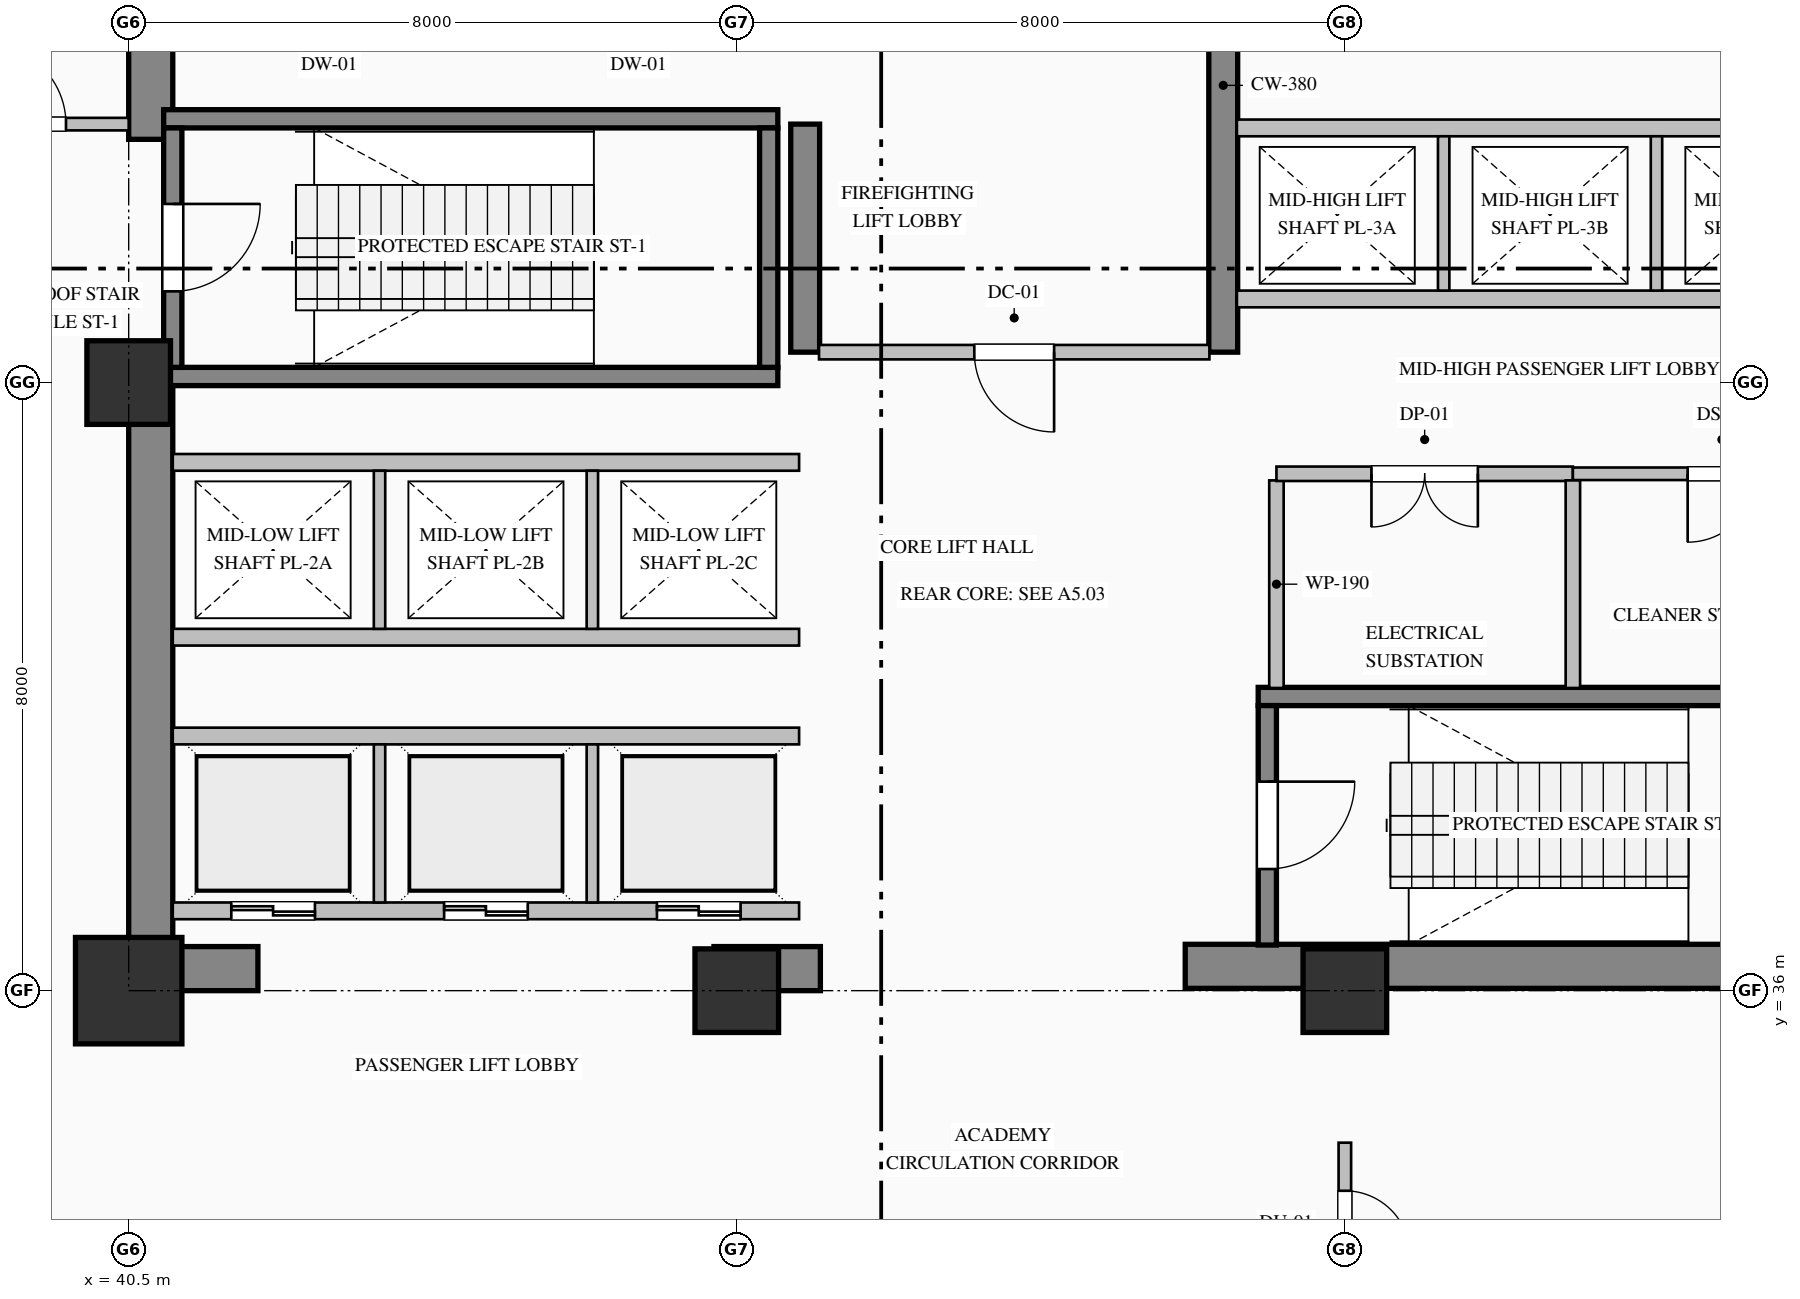
"""IFC4 building model, lengths in metres.
Left out: names, types, materials, properties, quantities, classifications, styles, units other than length and angle.
Written with IfcOpenShell. Run it as: python <this file> out.ifc"""

import sys

from ifc_helpers import new_model, si_unit, direction, frame, frame_2d, origin, origin_2d, place, context, subcontext, project, spatial, rectangle, hollow_rectangle, extrude, element, fill, save


model = new_model("IFC4")
c1 = context("Model", 3, precision=1e-05, world=origin(), true_north=direction((0.0, 1.0)))
c2 = subcontext(c1, "Body", "Model", "MODEL_VIEW")
j1 = project(units=[si_unit("LENGTHUNIT", "METRE"), si_unit("PLANEANGLEUNIT", "RADIAN")], contexts=[c1])
p1 = place(None, origin())
s1 = spatial("IfcSite", under=j1, at=p1, CompositionType="ELEMENT")
p2 = place(p1, origin())
s2 = spatial("IfcBuilding", under=s1, at=p2, CompositionType="ELEMENT")
p3 = place(p2, frame((0.0, 0.0, 17.4)))
s3 = spatial("IfcBuildingStorey", under=s2, at=p3, CompositionType="ELEMENT", Elevation=17.4)
p4 = place(p3, frame((40.79, 36.58, 0.0), z_axis=(0.0, 0.0, 1.0), x_axis=(0.0, 1.0, 0.0)))
e1 = element("IfcWall", 1, at=p4, inside=s3, PredefinedType="SHEAR", context=c2, shape_type="SweptSolid", body=[
    extrude(rectangle(XDim=7.82, YDim=0.58, at=frame_2d((3.91, 0.0))), origin(), (0.0, 0.0, 1.0), 5.14),
])
p5 = place(p3, frame((40.79, 47.2, 0.0), z_axis=(0.0, 0.0, 1.0), x_axis=(0.0, 1.0, 0.0)))
e2 = element("IfcWall", 2, at=p5, inside=s3, PredefinedType="SHEAR", context=c2, shape_type="SweptSolid", body=[
    extrude(rectangle(XDim=4.22, YDim=0.58, at=frame_2d((2.11, 0.0))), origin(), (0.0, 0.0, 1.0), 5.14),
])
p6 = place(p3, frame((40.5, 36.29, 0.0), z_axis=(0.0, 0.0, 1.0), x_axis=(1.0, 0.0, 0.0)))
e3 = element("IfcWall", 3, at=p6, inside=s3, PredefinedType="SHEAR", context=c2, shape_type="SweptSolid", body=[
    extrude(rectangle(XDim=1.7, YDim=0.58, at=frame_2d((0.85, 0.0))), origin(), (0.0, 0.0, 1.0), 5.14),
])
p7 = place(p3, frame((48.2, 36.29, 0.0), z_axis=(0.0, 0.0, 1.0), x_axis=(1.0, 0.0, 0.0)))
e4 = element("IfcWall", 4, at=p7, inside=s3, PredefinedType="SHEAR", context=c2, shape_type="SweptSolid", body=[
    extrude(rectangle(XDim=1.4, YDim=0.58, at=frame_2d((0.7, 0.0))), origin(), (0.0, 0.0, 1.0), 5.14),
])
p8 = place(p3, frame((54.4, 36.32, 0.0), z_axis=(0.0, 0.0, 1.0), x_axis=(1.0, 0.0, 0.0)))
e5 = element("IfcWall", 5, at=p8, inside=s3, PredefinedType="SHEAR", context=c2, shape_type="SweptSolid", body=[
    extrude(rectangle(XDim=9.6, YDim=0.58, at=frame_2d((4.8, 0.0))), origin(), (0.0, 0.0, 1.0), 5.4),
])
p9 = place(p3, frame((49.4, 44.4, 0.0), z_axis=(0.0, 0.0, 1.0), x_axis=(0.0, 1.0, 0.0)))
e6 = element("IfcWall", 6, at=p9, inside=s3, PredefinedType="SHEAR", context=c2, shape_type="SweptSolid", body=[
    extrude(rectangle(XDim=3.0, YDim=0.38, at=frame_2d((1.5, 0.0))), origin(), (0.0, 0.0, 1.0), 5.14),
])
p10 = place(p3, frame((54.9, 44.4, 0.0), z_axis=(0.0, 0.0, 1.0), x_axis=(0.0, 1.0, 0.0)))
e7 = element("IfcWall", 7, at=p10, inside=s3, PredefinedType="SHEAR", context=c2, shape_type="SweptSolid", body=[
    extrude(rectangle(XDim=7.02, YDim=0.38, at=frame_2d((3.51, 0.0))), origin(), (0.0, 0.0, 1.0), 5.14),
])
p11 = place(p3, frame((40.5, 36.0, 0.0), z_axis=(0.0, 0.0, 1.0), x_axis=(1.0, 0.0, 0.0)))
e8 = element("IfcColumn", 8, at=p11, inside=s3, PredefinedType="COLUMN", context=c2, shape_type="SweptSolid", body=[
    extrude(hollow_rectangle(XDim=1.4, YDim=1.4, WallThickness=0.05, at=origin_2d()), origin(), (0.0, 0.0, 1.0), 5.4),
])
for number, where, z_axis, x_axis in (
    (9, (40.5, 44.0, 0.0), (0.0, 0.0, 1.0), (1.0, 0.0, 0.0)),
    (10, (48.5, 36.0, 0.0), (0.0, 0.0, 1.0), (1.0, 0.0, 0.0)),
    (11, (56.5, 36.0, 0.0), (0.0, 0.0, 1.0), (1.0, 0.0, 0.0)),
):
    element("IfcColumn", number, at=place(p3, frame(where, z_axis=z_axis, x_axis=x_axis)), inside=s3, PredefinedType="COLUMN", context=c2, shape_type="SweptSolid", body=[
        extrude(rectangle(XDim=1.1, YDim=1.1, at=origin_2d()), origin(), (0.0, 0.0, 1.0), 5.4),
    ])
for number, where, z_axis, x_axis in (
    (12, (40.96, 47.47, 0.0), (0.0, 0.0, 1.0), (1.0, 0.0, 0.0)),
    (13, (49.04, 44.08, 0.0), (0.0, 0.0, 1.0), (-1.0, 0.0, 0.0)),
):
    element("IfcWall", number, at=place(p3, frame(where, z_axis=z_axis, x_axis=x_axis)), inside=s3, PredefinedType="SOLIDWALL", context=c2, shape_type="SweptSolid", body=[
        extrude(rectangle(XDim=8.08, YDim=0.24, at=frame_2d((4.04, 0.0))), origin(), (0.0, 0.0, 1.0), 5.4),
    ])
p12 = place(p3, frame((41.08, 47.35, 0.0), z_axis=(0.0, 0.0, 1.0), x_axis=(0.0, -1.0, 0.0)))
e14 = element("IfcWall", 14, at=p12, inside=s3, PredefinedType="SOLIDWALL", context=c2, shape_type="SweptSolid", body=[
    extrude(rectangle(XDim=3.15, YDim=0.24, at=frame_2d((1.575, 0.0))), origin(), (0.0, 0.0, 1.0), 5.4),
])
p13 = place(p12, frame((1.0, 0.0, 0.0)))
e15 = element("IfcOpeningElement", 15, at=p13, cuts=e14, PredefinedType="OPENING", context=c2, shape_type="SweptSolid", body=[
    extrude(rectangle(XDim=1.15, YDim=2.2, at=frame_2d((0.575, 1.1))), frame((0.0, 0.13, 0.0), z_axis=(0.0, -1.0, 0.0), x_axis=(1.0, 0.0, 0.0)), (0.0, 0.0, 1.0), 0.26),
])
p14 = place(p3, frame((48.92, 44.2, 0.0), z_axis=(0.0, 0.0, 1.0), x_axis=(0.0, 1.0, 0.0)))
e16 = element("IfcWall", 16, at=p14, inside=s3, PredefinedType="SOLIDWALL", context=c2, shape_type="SweptSolid", body=[
    extrude(rectangle(XDim=3.15, YDim=0.24, at=frame_2d((1.575, 0.0))), origin(), (0.0, 0.0, 1.0), 5.4),
])
p15 = place(p3, frame((55.36, 39.87, 0.0), z_axis=(0.0, 0.0, 1.0), x_axis=(1.0, 0.0, 0.0)))
e17 = element("IfcWall", 17, at=p15, inside=s3, PredefinedType="SOLIDWALL", context=c2, shape_type="SweptSolid", body=[
    extrude(rectangle(XDim=8.08, YDim=0.24, at=frame_2d((4.04, 0.0))), origin(), (0.0, 0.0, 1.0), 5.4),
])
p16 = place(p3, frame((55.48, 39.75, 0.0), z_axis=(0.0, 0.0, 1.0), x_axis=(0.0, -1.0, 0.0)))
e18 = element("IfcWall", 18, at=p16, inside=s3, PredefinedType="SOLIDWALL", context=c2, shape_type="SweptSolid", body=[
    extrude(rectangle(XDim=3.15, YDim=0.24, at=frame_2d((1.575, 0.0))), origin(), (0.0, 0.0, 1.0), 5.4),
])
p17 = place(p16, frame((1.0, 0.0, 0.0)))
e19 = element("IfcOpeningElement", 19, at=p17, cuts=e18, PredefinedType="OPENING", context=c2, shape_type="SweptSolid", body=[
    extrude(rectangle(XDim=1.15, YDim=2.2, at=frame_2d((0.575, 1.1))), frame((0.0, 0.13, 0.0), z_axis=(0.0, -1.0, 0.0), x_axis=(1.0, 0.0, 0.0)), (0.0, 0.0, 1.0), 0.26),
])
p18 = place(p3, frame((49.32, 37.05, 0.0), z_axis=(0.0, 0.0, 1.0), x_axis=(-1.0, 0.0, 0.0)))
e20 = element("IfcWall", 20, at=p18, inside=s3, PredefinedType="PARTITIONING", context=c2, shape_type="SweptSolid", body=[
    extrude(rectangle(XDim=8.24, YDim=0.22, at=frame_2d((4.12, 0.0))), origin(), (0.0, 0.0, 1.0), 5.14),
])
p19 = place(p18, frame((6.37, 0.0, 0.0)))
e21 = element("IfcOpeningElement", 21, at=p19, cuts=e20, PredefinedType="OPENING", context=c2, shape_type="SweptSolid", body=[
    extrude(rectangle(XDim=1.1, YDim=2.2, at=frame_2d((0.55, 1.1))), frame((0.0, 0.12, 0.0), z_axis=(0.0, -1.0, 0.0), x_axis=(1.0, 0.0, 0.0)), (0.0, 0.0, 1.0), 0.24),
])
p20 = place(p18, frame((3.57, 0.0, 0.0)))
e22 = element("IfcOpeningElement", 22, at=p20, cuts=e20, PredefinedType="OPENING", context=c2, shape_type="SweptSolid", body=[
    extrude(rectangle(XDim=1.1, YDim=2.2, at=frame_2d((0.55, 1.1))), frame((0.0, 0.12, 0.0), z_axis=(0.0, -1.0, 0.0), x_axis=(1.0, 0.0, 0.0)), (0.0, 0.0, 1.0), 0.24),
])
p21 = place(p18, frame((0.77, 0.0, 0.0)))
e23 = element("IfcOpeningElement", 23, at=p21, cuts=e20, PredefinedType="OPENING", context=c2, shape_type="SweptSolid", body=[
    extrude(rectangle(XDim=1.1, YDim=2.2, at=frame_2d((0.55, 1.1))), frame((0.0, 0.12, 0.0), z_axis=(0.0, -1.0, 0.0), x_axis=(1.0, 0.0, 0.0)), (0.0, 0.0, 1.0), 0.24),
])
p22 = place(p3, frame((41.08, 39.35, 0.0), z_axis=(0.0, 0.0, 1.0), x_axis=(1.0, 0.0, 0.0)))
e24 = element("IfcWall", 24, at=p22, inside=s3, PredefinedType="PARTITIONING", context=c2, shape_type="SweptSolid", body=[
    extrude(rectangle(XDim=8.24, YDim=0.22, at=frame_2d((4.12, 0.0))), origin(), (0.0, 0.0, 1.0), 5.14),
])
for number, where, z_axis, x_axis in (
    (25, (43.8, 37.16, 0.0), (0.0, 0.0, 1.0), (0.0, 1.0, 0.0)),
    (26, (46.6, 37.16, 0.0), (0.0, 0.0, 1.0), (0.0, 1.0, 0.0)),
):
    element("IfcWall", number, at=place(p3, frame(where, z_axis=z_axis, x_axis=x_axis)), inside=s3, PredefinedType="PARTITIONING", context=c2, shape_type="SweptSolid", body=[
        extrude(rectangle(XDim=2.08, YDim=0.15, at=frame_2d((1.04, 0.0))), origin(), (0.0, 0.0, 1.0), 5.14),
    ])
for number, where, z_axis, x_axis in (
    (27, (49.32, 40.65, 0.0), (0.0, 0.0, 1.0), (-1.0, 0.0, 0.0)),
    (28, (41.08, 42.95, 0.0), (0.0, 0.0, 1.0), (1.0, 0.0, 0.0)),
):
    element("IfcWall", number, at=place(p3, frame(where, z_axis=z_axis, x_axis=x_axis)), inside=s3, PredefinedType="PARTITIONING", context=c2, shape_type="SweptSolid", body=[
        extrude(rectangle(XDim=8.24, YDim=0.22, at=frame_2d((4.12, 0.0))), origin(), (0.0, 0.0, 1.0), 5.14),
    ])
for number, where, z_axis, x_axis in (
    (29, (43.8, 40.76, 0.0), (0.0, 0.0, 1.0), (0.0, 1.0, 0.0)),
    (30, (46.6, 40.76, 0.0), (0.0, 0.0, 1.0), (0.0, 1.0, 0.0)),
):
    element("IfcWall", number, at=place(p3, frame(where, z_axis=z_axis, x_axis=x_axis)), inside=s3, PredefinedType="PARTITIONING", context=c2, shape_type="SweptSolid", body=[
        extrude(rectangle(XDim=2.08, YDim=0.15, at=frame_2d((1.04, 0.0))), origin(), (0.0, 0.0, 1.0), 5.14),
    ])
for number, where, z_axis, x_axis in (
    (31, (63.32, 45.1, 0.0), (0.0, 0.0, 1.0), (-1.0, 0.0, 0.0)),
    (32, (55.08, 47.35, 0.0), (0.0, 0.0, 1.0), (1.0, 0.0, 0.0)),
):
    element("IfcWall", number, at=place(p3, frame(where, z_axis=z_axis, x_axis=x_axis)), inside=s3, PredefinedType="PARTITIONING", context=c2, shape_type="SweptSolid", body=[
        extrude(rectangle(XDim=8.24, YDim=0.22, at=frame_2d((4.12, 0.0))), origin(), (0.0, 0.0, 1.0), 5.14),
    ])
for number, where, z_axis, x_axis in (
    (33, (57.8, 45.21, 0.0), (0.0, 0.0, 1.0), (0.0, 1.0, 0.0)),
    (34, (60.6, 45.21, 0.0), (0.0, 0.0, 1.0), (0.0, 1.0, 0.0)),
):
    element("IfcWall", number, at=place(p3, frame(where, z_axis=z_axis, x_axis=x_axis)), inside=s3, PredefinedType="PARTITIONING", context=c2, shape_type="SweptSolid", body=[
        extrude(rectangle(XDim=2.03, YDim=0.15, at=frame_2d((1.015, 0.0))), origin(), (0.0, 0.0, 1.0), 5.14),
    ])
p23 = place(p3, frame((37.8, 47.4, 0.0), z_axis=(0.0, 0.0, 1.0), x_axis=(1.0, 0.0, 0.0)))
e35 = element("IfcWall", 35, at=p23, inside=s3, PredefinedType="PARTITIONING", context=c2, shape_type="SweptSolid", body=[
    extrude(rectangle(XDim=2.7, YDim=0.165, at=frame_2d((1.35, 0.0))), origin(), (0.0, 0.0, 1.0), 5.14),
])
p24 = place(p23, frame((0.825, 0.0, 0.0)))
e36 = element("IfcOpeningElement", 36, at=p24, cuts=e35, PredefinedType="OPENING", context=c2, shape_type="SweptSolid", body=[
    extrude(rectangle(XDim=1.05, YDim=2.15, at=frame_2d((0.525, 1.075))), frame((0.0, 0.093, 0.0), z_axis=(0.0, -1.0, 0.0), x_axis=(1.0, 0.0, 0.0)), (0.0, 0.0, 1.0), 0.185),
])
p25 = place(p3, frame((54.718, 44.4, 0.0), z_axis=(0.0, 0.0, 1.0), x_axis=(-1.0, 0.0, 0.0)))
e37 = element("IfcWall", 37, at=p25, inside=s3, PredefinedType="PARTITIONING", context=c2, shape_type="SweptSolid", body=[
    extrude(rectangle(XDim=5.136, YDim=0.19, at=frame_2d((2.568, 0.0))), origin(), (0.0, 0.0, 1.0), 5.14),
])
p26 = place(p25, frame((2.043, 0.0, 0.0)))
e38 = element("IfcOpeningElement", 38, at=p26, cuts=e37, PredefinedType="OPENING", context=c2, shape_type="SweptSolid", body=[
    extrude(rectangle(XDim=1.05, YDim=2.15, at=frame_2d((0.525, 1.075))), frame((0.0, 0.105, 0.0), z_axis=(0.0, -1.0, 0.0), x_axis=(1.0, 0.0, 0.0)), (0.0, 0.0, 1.0), 0.21),
])
p27 = place(p3, frame((55.6, 42.713, 0.0), z_axis=(0.0, 0.0, 1.0), x_axis=(0.0, -1.0, 0.0)))
e39 = element("IfcWall", 39, at=p27, inside=s3, PredefinedType="PARTITIONING", context=c2, shape_type="SweptSolid", body=[
    extrude(rectangle(XDim=2.731, YDim=0.19, at=frame_2d((1.365, 0.0))), origin(), (0.0, 0.0, 1.0), 5.14),
])
p28 = place(p3, frame((59.5, 42.8, 0.0), z_axis=(0.0, 0.0, 1.0), x_axis=(-1.0, 0.0, 0.0)))
e40 = element("IfcWall", 40, at=p28, inside=s3, PredefinedType="PARTITIONING", context=c2, shape_type="SweptSolid", body=[
    extrude(rectangle(XDim=3.9, YDim=0.19, at=frame_2d((1.95, 0.0))), origin(), (0.0, 0.0, 1.0), 5.14),
])
p29 = place(p28, frame((1.25, 0.0, 0.0)))
e41 = element("IfcOpeningElement", 41, at=p29, cuts=e40, PredefinedType="OPENING", context=c2, shape_type="SweptSolid", body=[
    extrude(rectangle(XDim=1.4, YDim=2.25, at=frame_2d((0.7, 1.125))), frame((0.0, 0.105, 0.0), z_axis=(0.0, -1.0, 0.0), x_axis=(1.0, 0.0, 0.0)), (0.0, 0.0, 1.0), 0.21),
])
p30 = place(p3, frame((63.42, 42.8, 0.0), z_axis=(0.0, 0.0, 1.0), x_axis=(-1.0, 0.0, 0.0)))
e42 = element("IfcWall", 42, at=p30, inside=s3, PredefinedType="PARTITIONING", context=c2, shape_type="SweptSolid", body=[
    extrude(rectangle(XDim=3.92, YDim=0.165, at=frame_2d((1.96, 0.0))), origin(), (0.0, 0.0, 1.0), 5.14),
])
p31 = place(p30, frame((1.51, 0.0, 0.0)))
e43 = element("IfcOpeningElement", 43, at=p31, cuts=e42, PredefinedType="OPENING", context=c2, shape_type="SweptSolid", body=[
    extrude(rectangle(XDim=0.9, YDim=2.15, at=frame_2d((0.45, 1.075))), frame((0.0, 0.093, 0.0), z_axis=(0.0, -1.0, 0.0), x_axis=(1.0, 0.0, 0.0)), (0.0, 0.0, 1.0), 0.185),
])
p32 = place(p3, frame((59.5, 42.713, 0.0), z_axis=(0.0, 0.0, 1.0), x_axis=(0.0, -1.0, 0.0)))
e44 = element("IfcWall", 44, at=p32, inside=s3, PredefinedType="PARTITIONING", context=c2, shape_type="SweptSolid", body=[
    extrude(rectangle(XDim=2.731, YDim=0.19, at=frame_2d((1.365, 0.0))), origin(), (0.0, 0.0, 1.0), 5.14),
])
p33 = place(p3, frame((56.5, 34.0, 0.0), z_axis=(0.0, 0.0, 1.0), x_axis=(0.0, -1.0, 0.0)))
e45 = element("IfcWall", 45, at=p33, inside=s3, PredefinedType="PARTITIONING", context=c2, shape_type="SweptSolid", body=[
    extrude(rectangle(XDim=2.125, YDim=0.165, at=frame_2d((1.063, 0.0))), origin(), (0.0, 0.0, 1.0), 4.232),
])
p34 = place(p33, frame((0.633, 0.0, 0.0)))
e46 = element("IfcOpeningElement", 46, at=p34, cuts=e45, PredefinedType="OPENING", context=c2, shape_type="SweptSolid", body=[
    extrude(rectangle(XDim=0.86, YDim=2.1, at=frame_2d((0.43, 1.05))), frame((0.0, 0.093, 0.0), z_axis=(0.0, -1.0, 0.0), x_axis=(1.0, 0.0, 0.0)), (0.0, 0.0, 1.0), 0.185),
])
p35 = place(p13, origin())
e47 = element("IfcDoor", 47, at=p35, inside=s3, OperationType="SINGLE_SWING_LEFT", PredefinedType="DOOR", context=c2, shape_type="SweptSolid", body=[
    extrude(rectangle(XDim=1.15, YDim=2.2, at=frame_2d((0.575, 1.1))), frame((0.0, 0.025, 0.0), z_axis=(0.0, -1.0, 0.0), x_axis=(1.0, 0.0, 0.0)), (0.0, 0.0, 1.0), 0.05),
])
fill(e15, e47)
p36 = place(p17, origin())
e48 = element("IfcDoor", 48, at=p36, inside=s3, OperationType="SINGLE_SWING_LEFT", PredefinedType="DOOR", context=c2, shape_type="SweptSolid", body=[
    extrude(rectangle(XDim=1.15, YDim=2.2, at=frame_2d((0.575, 1.1))), frame((0.0, 0.025, 0.0), z_axis=(0.0, -1.0, 0.0), x_axis=(1.0, 0.0, 0.0)), (0.0, 0.0, 1.0), 0.05),
])
fill(e19, e48)
p37 = place(p19, origin())
e49 = element("IfcDoor", 49, at=p37, inside=s3, OperationType="DOUBLE_DOOR_SLIDING", PredefinedType="DOOR", context=c2, shape_type="SweptSolid", body=[
    extrude(rectangle(XDim=1.1, YDim=2.2, at=frame_2d((0.55, 1.1))), frame((0.0, 0.025, 0.0), z_axis=(0.0, -1.0, 0.0), x_axis=(1.0, 0.0, 0.0)), (0.0, 0.0, 1.0), 0.05),
])
fill(e21, e49)
p38 = place(p20, origin())
e50 = element("IfcDoor", 50, at=p38, inside=s3, OperationType="DOUBLE_DOOR_SLIDING", PredefinedType="DOOR", context=c2, shape_type="SweptSolid", body=[
    extrude(rectangle(XDim=1.1, YDim=2.2, at=frame_2d((0.55, 1.1))), frame((0.0, 0.025, 0.0), z_axis=(0.0, -1.0, 0.0), x_axis=(1.0, 0.0, 0.0)), (0.0, 0.0, 1.0), 0.05),
])
fill(e22, e50)
p39 = place(p21, origin())
e51 = element("IfcDoor", 51, at=p39, inside=s3, OperationType="DOUBLE_DOOR_SLIDING", PredefinedType="DOOR", context=c2, shape_type="SweptSolid", body=[
    extrude(rectangle(XDim=1.1, YDim=2.2, at=frame_2d((0.55, 1.1))), frame((0.0, 0.025, 0.0), z_axis=(0.0, -1.0, 0.0), x_axis=(1.0, 0.0, 0.0)), (0.0, 0.0, 1.0), 0.05),
])
fill(e23, e51)
p40 = place(p26, origin())
e52 = element("IfcDoor", 52, at=p40, inside=s3, OperationType="SINGLE_SWING_LEFT", PredefinedType="DOOR", context=c2, shape_type="SweptSolid", body=[
    extrude(rectangle(XDim=1.05, YDim=2.15, at=frame_2d((0.525, 1.075))), frame((0.0, 0.025, 0.0), z_axis=(0.0, -1.0, 0.0), x_axis=(1.0, 0.0, 0.0)), (0.0, 0.0, 1.0), 0.05),
])
fill(e38, e52)
p41 = place(p24, origin())
e53 = element("IfcDoor", 53, at=p41, inside=s3, OperationType="SINGLE_SWING_LEFT", PredefinedType="DOOR", context=c2, shape_type="SweptSolid", body=[
    extrude(rectangle(XDim=1.05, YDim=2.15, at=frame_2d((0.525, 1.075))), frame((0.0, 0.025, 0.0), z_axis=(0.0, -1.0, 0.0), x_axis=(1.0, 0.0, 0.0)), (0.0, 0.0, 1.0), 0.05),
])
fill(e36, e53)
p42 = place(p29, origin())
e54 = element("IfcDoor", 54, at=p42, inside=s3, OperationType="DOUBLE_DOOR_SINGLE_SWING", PredefinedType="DOOR", context=c2, shape_type="SweptSolid", body=[
    extrude(rectangle(XDim=1.4, YDim=2.25, at=frame_2d((0.7, 1.125))), frame((0.0, 0.025, 0.0), z_axis=(0.0, -1.0, 0.0), x_axis=(1.0, 0.0, 0.0)), (0.0, 0.0, 1.0), 0.05),
])
fill(e41, e54)
p43 = place(p31, origin())
e55 = element("IfcDoor", 55, at=p43, inside=s3, OperationType="SINGLE_SWING_RIGHT", PredefinedType="DOOR", context=c2, shape_type="SweptSolid", body=[
    extrude(rectangle(XDim=0.9, YDim=2.15, at=frame_2d((0.45, 1.075))), frame((0.0, 0.025, 0.0), z_axis=(0.0, -1.0, 0.0), x_axis=(1.0, 0.0, 0.0)), (0.0, 0.0, 1.0), 0.05),
])
fill(e43, e55)
p44 = place(p34, origin())
e56 = element("IfcDoor", 56, at=p44, inside=s3, OperationType="SINGLE_SWING_RIGHT", PredefinedType="DOOR", context=c2, shape_type="SweptSolid", body=[
    extrude(rectangle(XDim=0.86, YDim=2.1, at=frame_2d((0.43, 1.05))), frame((0.0, 0.025, 0.0), z_axis=(0.0, -1.0, 0.0), x_axis=(1.0, 0.0, 0.0)), (0.0, 0.0, 1.0), 0.05),
])
fill(e46, e56)
save(model, sys.argv[1])
